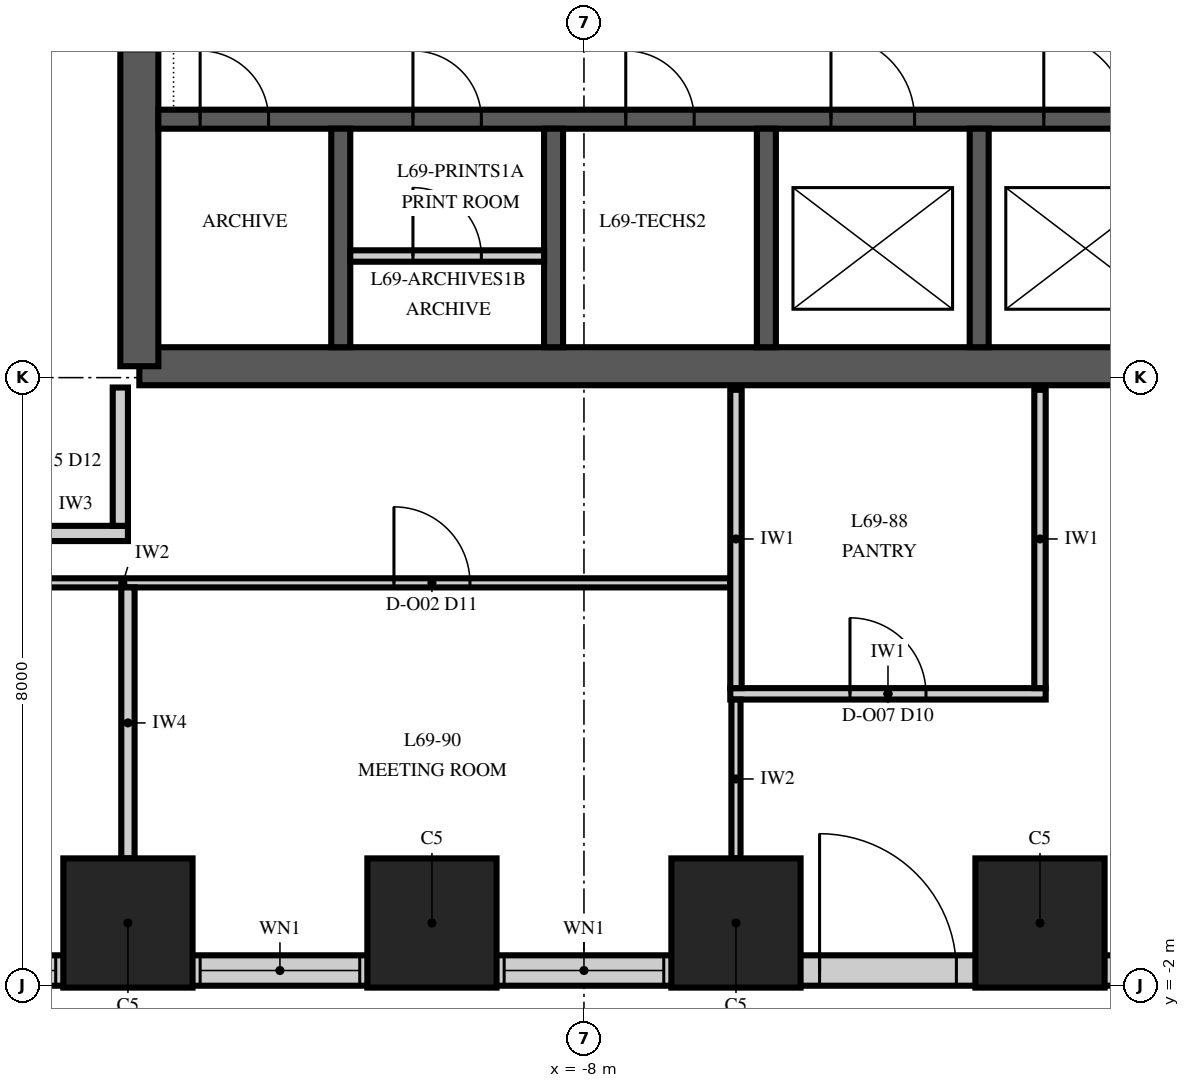
"""IFC4 building model, lengths in metres.
Left out: names, types, materials, properties, quantities, classifications, styles, units other than length and angle.
Written with IfcOpenShell. Run it as: python <this file> out.ifc"""

import sys

from ifc_helpers import new_model, si_unit, direction, frame, frame_2d, origin, origin_2d, place, context, subcontext, project, spatial, polyline, rectangle, outline, extrude, element, fill, save


model = new_model("IFC4")
c1 = context("Model", 3, precision=1e-05, world=origin(), true_north=direction((0.0, 1.0)))
c2 = subcontext(c1, "Body", "Model", "MODEL_VIEW")
j1 = project(units=[si_unit("LENGTHUNIT", "METRE"), si_unit("PLANEANGLEUNIT", "RADIAN")], contexts=[c1])
p1 = place(None, origin())
s1 = spatial("IfcSite", under=j1, at=p1, CompositionType="ELEMENT")
p2 = place(p1, origin())
s2 = spatial("IfcBuilding", under=s1, at=p2, CompositionType="ELEMENT")
p3 = place(p2, frame((0.0, 0.0, 296.0)))
s3 = spatial("IfcBuildingStorey", under=s2, at=p3, CompositionType="ELEMENT", Elevation=296.0)
for number, where, z_axis, x_axis in (
    (1, (-14.0, -1.175, -0.25), (0.0, 0.0, 1.0), (1.0, 0.0, 0.0)),
    (2, (-10.0, -1.175, -0.25), (0.0, 0.0, 1.0), (1.0, 0.0, 0.0)),
    (3, (-6.0, -1.175, -0.25), (0.0, 0.0, 1.0), (1.0, 0.0, 0.0)),
    (4, (-2.0, -1.175, -0.25), (0.0, 0.0, 1.0), (1.0, 0.0, 0.0)),
):
    element("IfcColumn", number, at=place(p3, frame(where, z_axis=z_axis, x_axis=x_axis)), inside=s3, PredefinedType="COLUMN", context=c2, shape_type="SweptSolid", body=[
        extrude(rectangle(XDim=1.7, YDim=1.7, at=origin_2d()), origin(), (0.0, 0.0, 1.0), 4.25),
    ])
p4 = place(p3, frame((-13.85, 6.15, 0.0), z_axis=(0.0, 0.0, 1.0), x_axis=(1.0, 0.0, 0.0)))
e5 = element("IfcWall", 5, at=p4, inside=s3, PredefinedType="SHEAR", context=c2, shape_type="SweptSolid", body=[
    extrude(rectangle(XDim=27.7, YDim=0.5, at=frame_2d((13.85, 0.0))), origin(), (0.0, 0.0, 1.0), 4.0),
])
p5 = place(p3, frame((-13.85, 23.85, 0.0), z_axis=(0.0, 0.0, 1.0), x_axis=(0.0, -1.0, 0.0)))
e6 = element("IfcWall", 6, at=p5, inside=s3, PredefinedType="SHEAR", context=c2, shape_type="SweptSolid", body=[
    extrude(outline(polyline([(0.0, -0.25), (17.7, -0.25), (17.7, 0.0), (17.45, 0.0), (17.45, 0.25), (0.25, 0.25), (0.25, 0.0), (0.0, 0.0), (0.0, -0.25)])), origin(), (0.0, 0.0, 1.0), 4.0),
])
p6 = place(p5, frame((11.75, 0.0, 0.0)))
e7 = element("IfcOpeningElement", 7, at=p6, cuts=e6, PredefinedType="OPENING", context=c2, shape_type="SweptSolid", body=[
    extrude(rectangle(XDim=1.8, YDim=2.4, at=frame_2d((0.9, 1.2))), frame((0.0, 0.265, 0.0), z_axis=(0.0, -1.0, 0.0), x_axis=(1.0, 0.0, 0.0)), (0.0, 0.0, 1.0), 0.53),
])
p7 = place(p3, frame((-13.6, 9.4, 0.0), z_axis=(0.0, 0.0, 1.0), x_axis=(1.0, 0.0, 0.0)))
e8 = element("IfcWall", 8, at=p7, inside=s3, PredefinedType="SHEAR", context=c2, shape_type="SweptSolid", body=[
    extrude(rectangle(XDim=27.2, YDim=0.25, at=frame_2d((13.6, 0.0))), origin(), (0.0, 0.0, 1.0), 4.0),
])
p8 = place(p7, frame((8.85, 0.0, 0.0)))
e9 = element("IfcOpeningElement", 9, at=p8, cuts=e8, PredefinedType="OPENING", context=c2, shape_type="SweptSolid", body=[
    extrude(rectangle(XDim=1.1, YDim=2.1, at=frame_2d((0.55, 1.05))), frame((0.0, 0.14, 0.0), z_axis=(0.0, -1.0, 0.0), x_axis=(1.0, 0.0, 0.0)), (0.0, 0.0, 1.0), 0.28),
])
p9 = place(p7, frame((11.65, 0.0, 0.0)))
e10 = element("IfcOpeningElement", 10, at=p9, cuts=e8, PredefinedType="OPENING", context=c2, shape_type="SweptSolid", body=[
    extrude(rectangle(XDim=1.1, YDim=2.1, at=frame_2d((0.55, 1.05))), frame((0.0, 0.14, 0.0), z_axis=(0.0, -1.0, 0.0), x_axis=(1.0, 0.0, 0.0)), (0.0, 0.0, 1.0), 0.28),
])
p10 = place(p7, frame((14.45, 0.0, 0.0)))
e11 = element("IfcOpeningElement", 11, at=p10, cuts=e8, PredefinedType="OPENING", context=c2, shape_type="SweptSolid", body=[
    extrude(rectangle(XDim=1.1, YDim=2.1, at=frame_2d((0.55, 1.05))), frame((0.0, 0.14, 0.0), z_axis=(0.0, -1.0, 0.0), x_axis=(1.0, 0.0, 0.0)), (0.0, 0.0, 1.0), 0.28),
])
p11 = place(p7, frame((0.55, 0.0, 0.0)))
e12 = element("IfcOpeningElement", 12, at=p11, cuts=e8, PredefinedType="OPENING", context=c2, shape_type="SweptSolid", body=[
    extrude(rectangle(XDim=0.9, YDim=2.1, at=frame_2d((0.45, 1.05))), frame((0.0, 0.14, 0.0), z_axis=(0.0, -1.0, 0.0), x_axis=(1.0, 0.0, 0.0)), (0.0, 0.0, 1.0), 0.28),
])
p12 = place(p7, frame((3.35, 0.0, 0.0)))
e13 = element("IfcOpeningElement", 13, at=p12, cuts=e8, PredefinedType="OPENING", context=c2, shape_type="SweptSolid", body=[
    extrude(rectangle(XDim=0.9, YDim=2.1, at=frame_2d((0.45, 1.05))), frame((0.0, 0.14, 0.0), z_axis=(0.0, -1.0, 0.0), x_axis=(1.0, 0.0, 0.0)), (0.0, 0.0, 1.0), 0.28),
])
p13 = place(p7, frame((6.15, 0.0, 0.0)))
e14 = element("IfcOpeningElement", 14, at=p13, cuts=e8, PredefinedType="OPENING", context=c2, shape_type="SweptSolid", body=[
    extrude(rectangle(XDim=0.9, YDim=2.1, at=frame_2d((0.45, 1.05))), frame((0.0, 0.14, 0.0), z_axis=(0.0, -1.0, 0.0), x_axis=(1.0, 0.0, 0.0)), (0.0, 0.0, 1.0), 0.28),
])
p14 = place(p7, frame((17.35, 0.0, 0.0)))
e15 = element("IfcOpeningElement", 15, at=p14, cuts=e8, PredefinedType="OPENING", context=c2, shape_type="SweptSolid", body=[
    extrude(rectangle(XDim=0.9, YDim=2.1, at=frame_2d((0.45, 1.05))), frame((0.0, 0.14, 0.0), z_axis=(0.0, -1.0, 0.0), x_axis=(1.0, 0.0, 0.0)), (0.0, 0.0, 1.0), 0.28),
])
p15 = place(p7, frame((20.15, 0.0, 0.0)))
e16 = element("IfcOpeningElement", 16, at=p15, cuts=e8, PredefinedType="OPENING", context=c2, shape_type="SweptSolid", body=[
    extrude(rectangle(XDim=0.9, YDim=2.1, at=frame_2d((0.45, 1.05))), frame((0.0, 0.14, 0.0), z_axis=(0.0, -1.0, 0.0), x_axis=(1.0, 0.0, 0.0)), (0.0, 0.0, 1.0), 0.28),
])
p16 = place(p7, frame((22.95, 0.0, 0.0)))
e17 = element("IfcOpeningElement", 17, at=p16, cuts=e8, PredefinedType="OPENING", context=c2, shape_type="SweptSolid", body=[
    extrude(rectangle(XDim=0.9, YDim=2.1, at=frame_2d((0.45, 1.05))), frame((0.0, 0.14, 0.0), z_axis=(0.0, -1.0, 0.0), x_axis=(1.0, 0.0, 0.0)), (0.0, 0.0, 1.0), 0.28),
])
for number, where, z_axis, x_axis in (
    (18, (-11.2, 6.4, 0.0), (0.0, 0.0, 1.0), (0.0, 1.0, 0.0)),
    (19, (-8.4, 6.4, 0.0), (0.0, 0.0, 1.0), (0.0, 1.0, 0.0)),
    (20, (-5.6, 6.4, 0.0), (0.0, 0.0, 1.0), (0.0, 1.0, 0.0)),
    (21, (-2.8, 6.4, 0.0), (0.0, 0.0, 1.0), (0.0, 1.0, 0.0)),
):
    element("IfcWall", number, at=place(p3, frame(where, z_axis=z_axis, x_axis=x_axis)), inside=s3, PredefinedType="SHEAR", context=c2, shape_type="SweptSolid", body=[
        extrude(rectangle(XDim=2.875, YDim=0.25, at=frame_2d((1.438, 0.0))), origin(), (0.0, 0.0, 1.0), 4.0),
    ])
p17 = place(p3, frame((-26.0, -1.8, 0.0), z_axis=(0.0, 0.0, 1.0), x_axis=(1.0, 0.0, 0.0)))
e22 = element("IfcWall", 22, at=p17, inside=s3, PredefinedType="SOLIDWALL", context=c2, shape_type="SweptSolid", body=[
    extrude(rectangle(XDim=52.0, YDim=0.4, at=frame_2d((26.0, 0.0))), origin(), (0.0, 0.0, 1.0), 2.0),
])
p18 = place(p17, frame((0.95, 0.0, 0.8)))
e23 = element("IfcOpeningElement", 23, at=p18, cuts=e22, PredefinedType="OPENING", context=c2, shape_type="SweptSolid", body=[
    extrude(rectangle(XDim=2.1, YDim=1.15, at=frame_2d((1.05, 0.575))), frame((0.0, 0.215, 0.0), z_axis=(0.0, -1.0, 0.0), x_axis=(1.0, 0.0, 0.0)), (0.0, 0.0, 1.0), 0.43),
])
p19 = place(p17, frame((4.95, 0.0, 0.8)))
e24 = element("IfcOpeningElement", 24, at=p19, cuts=e22, PredefinedType="OPENING", context=c2, shape_type="SweptSolid", body=[
    extrude(rectangle(XDim=2.1, YDim=1.15, at=frame_2d((1.05, 0.575))), frame((0.0, 0.215, 0.0), z_axis=(0.0, -1.0, 0.0), x_axis=(1.0, 0.0, 0.0)), (0.0, 0.0, 1.0), 0.43),
])
p20 = place(p17, frame((8.95, 0.0, 0.8)))
e25 = element("IfcOpeningElement", 25, at=p20, cuts=e22, PredefinedType="OPENING", context=c2, shape_type="SweptSolid", body=[
    extrude(rectangle(XDim=2.1, YDim=1.15, at=frame_2d((1.05, 0.575))), frame((0.0, 0.215, 0.0), z_axis=(0.0, -1.0, 0.0), x_axis=(1.0, 0.0, 0.0)), (0.0, 0.0, 1.0), 0.43),
])
p21 = place(p17, frame((12.95, 0.0, 0.8)))
e26 = element("IfcOpeningElement", 26, at=p21, cuts=e22, PredefinedType="OPENING", context=c2, shape_type="SweptSolid", body=[
    extrude(rectangle(XDim=2.1, YDim=1.15, at=frame_2d((1.05, 0.575))), frame((0.0, 0.215, 0.0), z_axis=(0.0, -1.0, 0.0), x_axis=(1.0, 0.0, 0.0)), (0.0, 0.0, 1.0), 0.43),
])
p22 = place(p17, frame((16.95, 0.0, 0.8)))
e27 = element("IfcOpeningElement", 27, at=p22, cuts=e22, PredefinedType="OPENING", context=c2, shape_type="SweptSolid", body=[
    extrude(rectangle(XDim=2.1, YDim=1.15, at=frame_2d((1.05, 0.575))), frame((0.0, 0.215, 0.0), z_axis=(0.0, -1.0, 0.0), x_axis=(1.0, 0.0, 0.0)), (0.0, 0.0, 1.0), 0.43),
])
p23 = place(p17, frame((21.1, 0.0, 0.0)))
e28 = element("IfcOpeningElement", 28, at=p23, cuts=e22, PredefinedType="OPENING", context=c2, shape_type="SweptSolid", body=[
    extrude(rectangle(XDim=1.8, YDim=2.0, at=frame_2d((0.9, 1.0))), frame((0.0, 0.215, 0.0), z_axis=(0.0, -1.0, 0.0), x_axis=(1.0, 0.0, 0.0)), (0.0, 0.0, 1.0), 0.43),
])
p24 = place(p17, frame((24.95, 0.0, 0.8)))
e29 = element("IfcOpeningElement", 29, at=p24, cuts=e22, PredefinedType="OPENING", context=c2, shape_type="SweptSolid", body=[
    extrude(rectangle(XDim=2.1, YDim=1.15, at=frame_2d((1.05, 0.575))), frame((0.0, 0.215, 0.0), z_axis=(0.0, -1.0, 0.0), x_axis=(1.0, 0.0, 0.0)), (0.0, 0.0, 1.0), 0.43),
])
p25 = place(p17, frame((29.1, 0.0, 0.0)))
e30 = element("IfcOpeningElement", 30, at=p25, cuts=e22, PredefinedType="OPENING", context=c2, shape_type="SweptSolid", body=[
    extrude(rectangle(XDim=1.8, YDim=2.0, at=frame_2d((0.9, 1.0))), frame((0.0, 0.215, 0.0), z_axis=(0.0, -1.0, 0.0), x_axis=(1.0, 0.0, 0.0)), (0.0, 0.0, 1.0), 0.43),
])
p26 = place(p17, frame((32.95, 0.0, 0.8)))
e31 = element("IfcOpeningElement", 31, at=p26, cuts=e22, PredefinedType="OPENING", context=c2, shape_type="SweptSolid", body=[
    extrude(rectangle(XDim=2.1, YDim=1.15, at=frame_2d((1.05, 0.575))), frame((0.0, 0.215, 0.0), z_axis=(0.0, -1.0, 0.0), x_axis=(1.0, 0.0, 0.0)), (0.0, 0.0, 1.0), 0.43),
])
p27 = place(p17, frame((36.95, 0.0, 0.8)))
e32 = element("IfcOpeningElement", 32, at=p27, cuts=e22, PredefinedType="OPENING", context=c2, shape_type="SweptSolid", body=[
    extrude(rectangle(XDim=2.1, YDim=1.15, at=frame_2d((1.05, 0.575))), frame((0.0, 0.215, 0.0), z_axis=(0.0, -1.0, 0.0), x_axis=(1.0, 0.0, 0.0)), (0.0, 0.0, 1.0), 0.43),
])
p28 = place(p17, frame((40.95, 0.0, 0.8)))
e33 = element("IfcOpeningElement", 33, at=p28, cuts=e22, PredefinedType="OPENING", context=c2, shape_type="SweptSolid", body=[
    extrude(rectangle(XDim=2.1, YDim=1.15, at=frame_2d((1.05, 0.575))), frame((0.0, 0.215, 0.0), z_axis=(0.0, -1.0, 0.0), x_axis=(1.0, 0.0, 0.0)), (0.0, 0.0, 1.0), 0.43),
])
p29 = place(p17, frame((44.95, 0.0, 0.8)))
e34 = element("IfcOpeningElement", 34, at=p29, cuts=e22, PredefinedType="OPENING", context=c2, shape_type="SweptSolid", body=[
    extrude(rectangle(XDim=2.1, YDim=1.15, at=frame_2d((1.05, 0.575))), frame((0.0, 0.215, 0.0), z_axis=(0.0, -1.0, 0.0), x_axis=(1.0, 0.0, 0.0)), (0.0, 0.0, 1.0), 0.43),
])
p30 = place(p17, frame((48.95, 0.0, 0.8)))
e35 = element("IfcOpeningElement", 35, at=p30, cuts=e22, PredefinedType="OPENING", context=c2, shape_type="SweptSolid", body=[
    extrude(rectangle(XDim=2.1, YDim=1.15, at=frame_2d((1.05, 0.575))), frame((0.0, 0.215, 0.0), z_axis=(0.0, -1.0, 0.0), x_axis=(1.0, 0.0, 0.0)), (0.0, 0.0, 1.0), 0.43),
])
p31 = place(p3, frame((-11.075, 7.6, 0.0), z_axis=(0.0, 0.0, 1.0), x_axis=(1.0, 0.0, 0.0)))
e36 = element("IfcWall", 36, at=p31, inside=s3, PredefinedType="PARTITIONING", context=c2, shape_type="SweptSolid", body=[
    extrude(rectangle(XDim=2.55, YDim=0.15, at=frame_2d((1.275, 0.0))), origin(), (0.0, 0.0, 1.0), 3.85),
])
p32 = place(p31, frame((0.825, 0.0, 0.0)))
e37 = element("IfcOpeningElement", 37, at=p32, cuts=e36, PredefinedType="OPENING", context=c2, shape_type="SweptSolid", body=[
    extrude(rectangle(XDim=0.9, YDim=2.1, at=frame_2d((0.45, 1.05))), frame((0.0, 0.09, 0.0), z_axis=(0.0, -1.0, 0.0), x_axis=(1.0, 0.0, 0.0)), (0.0, 0.0, 1.0), 0.18),
])
p33 = place(p3, frame((-6.075, 1.84, 0.0), z_axis=(0.0, 0.0, 1.0), x_axis=(1.0, 0.0, 0.0)))
e38 = element("IfcWall", 38, at=p33, inside=s3, PredefinedType="PARTITIONING", context=c2, shape_type="SweptSolid", body=[
    extrude(rectangle(XDim=4.15, YDim=0.15, at=frame_2d((2.075, 0.0))), origin(), (0.0, 0.0, 1.0), 3.23),
])
p34 = place(p33, frame((1.575, 0.0, 0.0)))
e39 = element("IfcOpeningElement", 39, at=p34, cuts=e38, PredefinedType="OPENING", context=c2, shape_type="SweptSolid", body=[
    extrude(rectangle(XDim=1.0, YDim=2.3, at=frame_2d((0.5, 1.15))), frame((0.0, 0.09, 0.0), z_axis=(0.0, -1.0, 0.0), x_axis=(1.0, 0.0, 0.0)), (0.0, 0.0, 1.0), 0.18),
])
p35 = place(p3, frame((-22.06, 3.3, 0.0), z_axis=(0.0, 0.0, 1.0), x_axis=(1.0, 0.0, 0.0)))
e40 = element("IfcWall", 40, at=p35, inside=s3, PredefinedType="PARTITIONING", context=c2, shape_type="SweptSolid", body=[
    extrude(rectangle(XDim=15.985, YDim=0.12, at=frame_2d((7.993, 0.0))), origin(), (0.0, 0.0, 1.0), 3.23),
])
p36 = place(p35, frame((3.56, 0.0, 0.0)))
e41 = element("IfcOpeningElement", 41, at=p36, cuts=e40, PredefinedType="OPENING", context=c2, shape_type="SweptSolid", body=[
    extrude(rectangle(XDim=1.0, YDim=2.4, at=frame_2d((0.5, 1.2))), frame((0.0, 0.075, 0.0), z_axis=(0.0, -1.0, 0.0), x_axis=(1.0, 0.0, 0.0)), (0.0, 0.0, 1.0), 0.15),
])
p37 = place(p35, frame((11.56, 0.0, 0.0)))
e42 = element("IfcOpeningElement", 42, at=p37, cuts=e40, PredefinedType="OPENING", context=c2, shape_type="SweptSolid", body=[
    extrude(rectangle(XDim=1.0, YDim=2.4, at=frame_2d((0.5, 1.2))), frame((0.0, 0.075, 0.0), z_axis=(0.0, -1.0, 0.0), x_axis=(1.0, 0.0, 0.0)), (0.0, 0.0, 1.0), 0.15),
])
p38 = place(p3, frame((-16.15, 3.95, 0.0), z_axis=(0.0, 0.0, 1.0), x_axis=(1.0, 0.0, 0.0)))
e43 = element("IfcWall", 43, at=p38, inside=s3, PredefinedType="PARTITIONING", context=c2, shape_type="SweptSolid", body=[
    extrude(rectangle(XDim=2.15, YDim=0.2, at=frame_2d((1.075, 0.0))), origin(), (0.0, 0.0, 1.0), 3.85),
])
p39 = place(p3, frame((-14.1, 4.05, 0.0), z_axis=(0.0, 0.0, 1.0), x_axis=(0.0, 1.0, 0.0)))
e44 = element("IfcWall", 44, at=p39, inside=s3, PredefinedType="PARTITIONING", context=c2, shape_type="SweptSolid", body=[
    extrude(rectangle(XDim=1.82, YDim=0.2, at=frame_2d((0.91, 0.0))), origin(), (0.0, 0.0, 1.0), 3.85),
])
p40 = place(p3, frame((-14.0, -0.325, 0.0), z_axis=(0.0, 0.0, 1.0), x_axis=(0.0, 1.0, 0.0)))
e45 = element("IfcWall", 45, at=p40, inside=s3, PredefinedType="PARTITIONING", context=c2, shape_type="SweptSolid", body=[
    extrude(rectangle(XDim=3.565, YDim=0.175, at=frame_2d((1.782, 0.0))), origin(), (0.0, 0.0, 1.0), 3.23),
])
p41 = place(p3, frame((-6.0, -0.325, 0.0), z_axis=(0.0, 0.0, 1.0), x_axis=(0.0, 1.0, 0.0)))
e46 = element("IfcWall", 46, at=p41, inside=s3, PredefinedType="PARTITIONING", context=c2, shape_type="SweptSolid", body=[
    extrude(rectangle(XDim=2.09, YDim=0.12, at=frame_2d((1.045, 0.0))), origin(), (0.0, 0.0, 1.0), 3.23),
])
p42 = place(p3, frame((-6.0, 1.915, 0.0), z_axis=(0.0, 0.0, 1.0), x_axis=(0.0, 1.0, 0.0)))
e47 = element("IfcWall", 47, at=p42, inside=s3, PredefinedType="PARTITIONING", context=c2, shape_type="SweptSolid", body=[
    extrude(rectangle(XDim=3.925, YDim=0.15, at=frame_2d((1.962, 0.0))), origin(), (0.0, 0.0, 1.0), 3.23),
])
p43 = place(p3, frame((-2.0, 1.915, 0.0), z_axis=(0.0, 0.0, 1.0), x_axis=(0.0, 1.0, 0.0)))
e48 = element("IfcWall", 48, at=p43, inside=s3, PredefinedType="PARTITIONING", context=c2, shape_type="SweptSolid", body=[
    extrude(rectangle(XDim=3.925, YDim=0.15, at=frame_2d((1.962, 0.0))), origin(), (0.0, 0.0, 1.0), 3.85),
])
p44 = place(p20, origin())
e49 = element("IfcWindow", 49, at=p44, inside=s3, PartitioningType="SINGLE_PANEL", PredefinedType="WINDOW", context=c2, shape_type="SweptSolid", body=[
    extrude(rectangle(XDim=2.1, YDim=1.15, at=frame_2d((1.05, 0.575))), frame((0.0, 0.03, 0.0), z_axis=(0.0, -1.0, 0.0), x_axis=(1.0, 0.0, 0.0)), (0.0, 0.0, 1.0), 0.06),
])
fill(e25, e49)
p45 = place(p21, origin())
e50 = element("IfcWindow", 50, at=p45, inside=s3, PartitioningType="SINGLE_PANEL", PredefinedType="WINDOW", context=c2, shape_type="SweptSolid", body=[
    extrude(rectangle(XDim=2.1, YDim=1.15, at=frame_2d((1.05, 0.575))), frame((0.0, 0.03, 0.0), z_axis=(0.0, -1.0, 0.0), x_axis=(1.0, 0.0, 0.0)), (0.0, 0.0, 1.0), 0.06),
])
fill(e26, e50)
p46 = place(p22, origin())
e51 = element("IfcWindow", 51, at=p46, inside=s3, PartitioningType="SINGLE_PANEL", PredefinedType="WINDOW", context=c2, shape_type="SweptSolid", body=[
    extrude(rectangle(XDim=2.1, YDim=1.15, at=frame_2d((1.05, 0.575))), frame((0.0, 0.03, 0.0), z_axis=(0.0, -1.0, 0.0), x_axis=(1.0, 0.0, 0.0)), (0.0, 0.0, 1.0), 0.06),
])
fill(e27, e51)
p47 = place(p23, origin())
e52 = element("IfcDoor", 52, at=p47, inside=s3, OperationType="DOUBLE_DOOR_SINGLE_SWING", PredefinedType="DOOR", context=c2, shape_type="SweptSolid", body=[
    extrude(rectangle(XDim=1.8, YDim=2.0, at=frame_2d((0.9, 1.0))), frame((0.0, 0.2, 0.0), z_axis=(0.0, -1.0, 0.0), x_axis=(1.0, 0.0, 0.0)), (0.0, 0.0, 1.0), 0.399),
])
fill(e28, e52)
p48 = place(p8, origin())
e53 = element("IfcDoor", 53, at=p48, inside=s3, OperationType="SLIDING_TO_LEFT", PredefinedType="DOOR", context=c2, shape_type="SweptSolid", body=[
    extrude(rectangle(XDim=1.1, YDim=2.1, at=frame_2d((0.55, 1.05))), frame((0.0, 0.125, 0.0), z_axis=(0.0, -1.0, 0.0), x_axis=(1.0, 0.0, 0.0)), (0.0, 0.0, 1.0), 0.25),
])
fill(e9, e53)
p49 = place(p9, origin())
e54 = element("IfcDoor", 54, at=p49, inside=s3, OperationType="SLIDING_TO_LEFT", PredefinedType="DOOR", context=c2, shape_type="SweptSolid", body=[
    extrude(rectangle(XDim=1.1, YDim=2.1, at=frame_2d((0.55, 1.05))), frame((0.0, 0.125, 0.0), z_axis=(0.0, -1.0, 0.0), x_axis=(1.0, 0.0, 0.0)), (0.0, 0.0, 1.0), 0.25),
])
fill(e10, e54)
p50 = place(p11, origin())
e55 = element("IfcDoor", 55, at=p50, inside=s3, OperationType="SINGLE_SWING_LEFT", PredefinedType="DOOR", context=c2, shape_type="SweptSolid", body=[
    extrude(rectangle(XDim=0.9, YDim=2.1, at=frame_2d((0.45, 1.05))), frame((0.0, 0.125, 0.0), z_axis=(0.0, -1.0, 0.0), x_axis=(1.0, 0.0, 0.0)), (0.0, 0.0, 1.0), 0.25),
])
fill(e12, e55)
p51 = place(p12, origin())
e56 = element("IfcDoor", 56, at=p51, inside=s3, OperationType="SINGLE_SWING_LEFT", PredefinedType="DOOR", context=c2, shape_type="SweptSolid", body=[
    extrude(rectangle(XDim=0.9, YDim=2.1, at=frame_2d((0.45, 1.05))), frame((0.0, 0.125, 0.0), z_axis=(0.0, -1.0, 0.0), x_axis=(1.0, 0.0, 0.0)), (0.0, 0.0, 1.0), 0.25),
])
fill(e13, e56)
p52 = place(p32, origin())
e57 = element("IfcDoor", 57, at=p52, inside=s3, OperationType="SINGLE_SWING_LEFT", PredefinedType="DOOR", context=c2, shape_type="SweptSolid", body=[
    extrude(rectangle(XDim=0.9, YDim=2.1, at=frame_2d((0.45, 1.05))), frame((0.0, 0.075, 0.0), z_axis=(0.0, -1.0, 0.0), x_axis=(1.0, 0.0, 0.0)), (0.0, 0.0, 1.0), 0.149),
])
fill(e37, e57)
p53 = place(p13, origin())
e58 = element("IfcDoor", 58, at=p53, inside=s3, OperationType="SINGLE_SWING_LEFT", PredefinedType="DOOR", context=c2, shape_type="SweptSolid", body=[
    extrude(rectangle(XDim=0.9, YDim=2.1, at=frame_2d((0.45, 1.05))), frame((0.0, 0.125, 0.0), z_axis=(0.0, -1.0, 0.0), x_axis=(1.0, 0.0, 0.0)), (0.0, 0.0, 1.0), 0.25),
])
fill(e14, e58)
p54 = place(p37, origin())
e59 = element("IfcDoor", 59, at=p54, inside=s3, OperationType="SINGLE_SWING_RIGHT", PredefinedType="DOOR", context=c2, shape_type="SweptSolid", body=[
    extrude(rectangle(XDim=1.0, YDim=2.4, at=frame_2d((0.5, 1.2))), frame((0.0, 0.06, 0.0), z_axis=(0.0, -1.0, 0.0), x_axis=(1.0, 0.0, 0.0)), (0.0, 0.0, 1.0), 0.12),
])
fill(e42, e59)
p55 = place(p34, origin())
e60 = element("IfcDoor", 60, at=p55, inside=s3, OperationType="SINGLE_SWING_LEFT", PredefinedType="DOOR", context=c2, shape_type="SweptSolid", body=[
    extrude(rectangle(XDim=1.0, YDim=2.3, at=frame_2d((0.5, 1.15))), frame((0.0, 0.075, 0.0), z_axis=(0.0, -1.0, 0.0), x_axis=(1.0, 0.0, 0.0)), (0.0, 0.0, 1.0), 0.149),
])
fill(e39, e60)
save(model, sys.argv[1])
